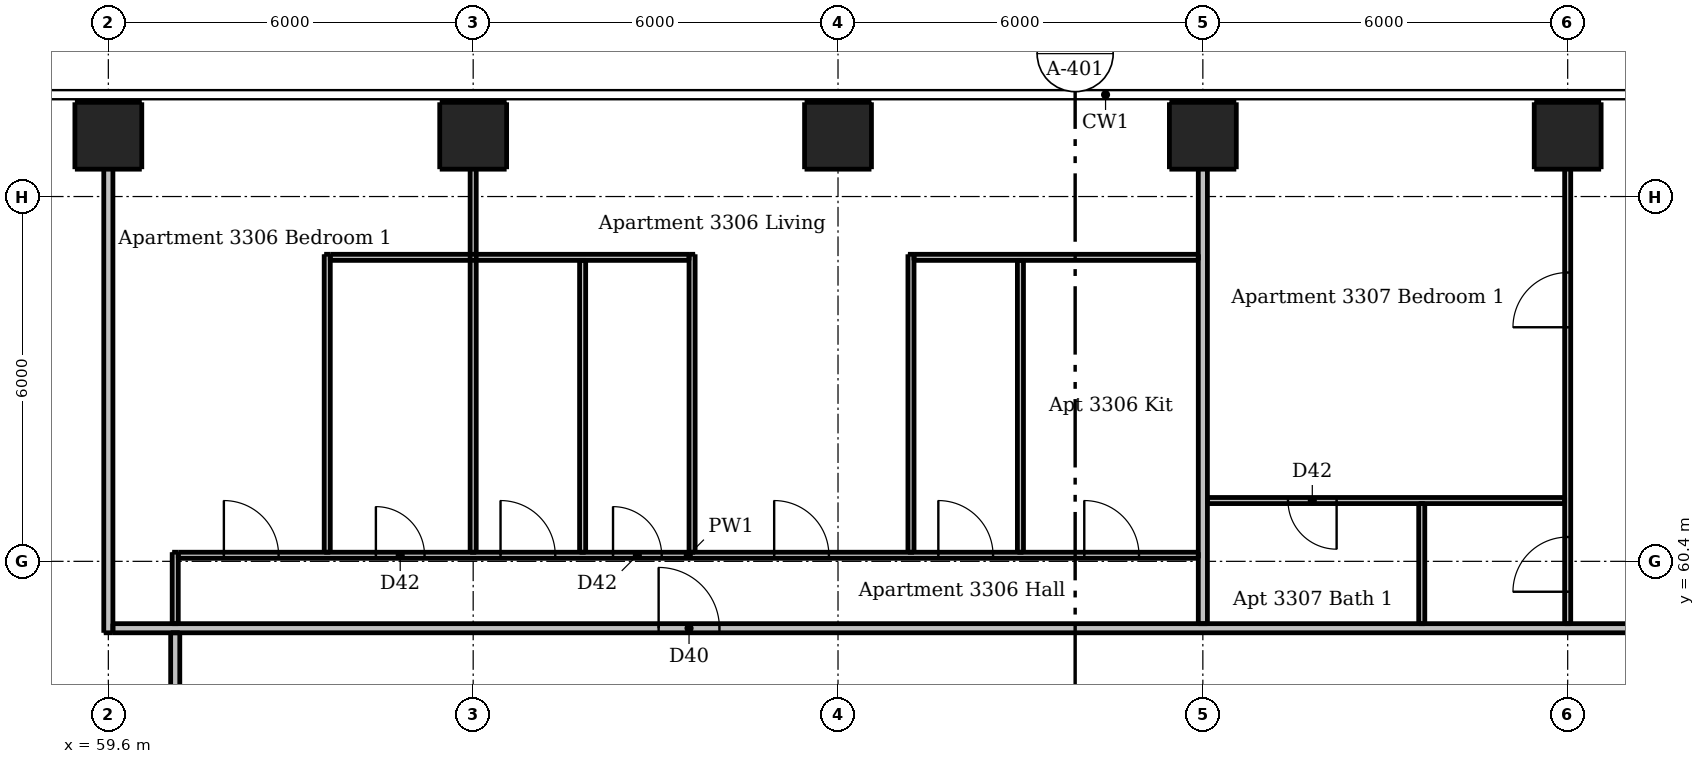
"""IFC4 building model, lengths in metres.
Left out: names, types, materials, properties, quantities, classifications, styles, units other than length and angle.
Written with IfcOpenShell. Run it as: python <this file> out.ifc"""

import sys

from ifc_helpers import new_model, si_unit, direction, frame, frame_2d, origin, origin_2d, place, context, subcontext, project, spatial, rectangle, extrude, element, fill, save


model = new_model("IFC4")
c1 = context("Model", 3, precision=1e-05, world=origin(), true_north=direction((0.0, 1.0)))
c2 = subcontext(c1, "Body", "Model", "MODEL_VIEW")
j1 = project(units=[si_unit("LENGTHUNIT", "METRE"), si_unit("PLANEANGLEUNIT", "RADIAN")], contexts=[c1])
p1 = place(None, origin())
s1 = spatial("IfcSite", under=j1, at=p1, CompositionType="ELEMENT")
p2 = place(p1, origin())
s2 = spatial("IfcBuilding", under=s1, at=p2, CompositionType="ELEMENT")
p3 = place(p2, frame((0.0, 0.0, 121.6)))
s3 = spatial("IfcBuildingStorey", under=s2, at=p3, CompositionType="ELEMENT", Elevation=121.6)
for number, where, z_axis, x_axis in (
    (1, (59.6, 67.4, 0.0), (0.0, 0.0, 1.0), (1.0, 0.0, 0.0)),
    (2, (65.6, 67.4, 0.0), (0.0, 0.0, 1.0), (1.0, 0.0, 0.0)),
    (3, (71.6, 67.4, 0.0), (0.0, 0.0, 1.0), (1.0, 0.0, 0.0)),
    (4, (77.6, 67.4, 0.0), (0.0, 0.0, 1.0), (1.0, 0.0, 0.0)),
    (5, (83.6, 67.4, 0.0), (0.0, 0.0, 1.0), (1.0, 0.0, 0.0)),
):
    element("IfcColumn", number, at=place(p3, frame(where, z_axis=z_axis, x_axis=x_axis)), inside=s3, PredefinedType="COLUMN", context=c2, shape_type="SweptSolid", body=[
        extrude(rectangle(XDim=1.1, YDim=1.1, at=origin_2d()), origin(), (0.0, 0.0, 1.0), 2.95),
    ])
p4 = place(p3, frame((60.7, 59.375, 0.0), z_axis=(0.0, 0.0, 1.0), x_axis=(0.0, 1.0, 0.0)))
e6 = element("IfcWall", 6, at=p4, inside=s3, PredefinedType="PARTITIONING", context=c2, shape_type="SweptSolid", body=[
    extrude(rectangle(XDim=1.175, YDim=0.1, at=frame_2d((0.587, 0.0))), origin(), (0.0, 0.0, 1.0), 2.95),
])
p5 = place(p3, frame((63.2, 60.55, 0.0), z_axis=(0.0, 0.0, 1.0), x_axis=(0.0, 1.0, 0.0)))
e7 = element("IfcWall", 7, at=p5, inside=s3, PredefinedType="PARTITIONING", context=c2, shape_type="SweptSolid", body=[
    extrude(rectangle(XDim=4.9, YDim=0.1, at=frame_2d((2.45, 0.0))), origin(), (0.0, 0.0, 1.0), 2.95),
])
p6 = place(p3, frame((65.6, 60.55, 0.0), z_axis=(0.0, 0.0, 1.0), x_axis=(0.0, 1.0, 0.0)))
e8 = element("IfcWall", 8, at=p6, inside=s3, PredefinedType="PARTITIONING", context=c2, shape_type="SweptSolid", body=[
    extrude(rectangle(XDim=7.45, YDim=0.1, at=frame_2d((3.725, 0.0))), origin(), (0.0, 0.0, 1.0), 2.332),
])
p7 = place(p3, frame((67.4, 60.55, 0.0), z_axis=(0.0, 0.0, 1.0), x_axis=(0.0, 1.0, 0.0)))
e9 = element("IfcWall", 9, at=p7, inside=s3, PredefinedType="PARTITIONING", context=c2, shape_type="SweptSolid", body=[
    extrude(rectangle(XDim=4.8, YDim=0.1, at=frame_2d((2.4, 0.0))), origin(), (0.0, 0.0, 1.0), 2.95),
])
for number, where, z_axis, x_axis in (
    (10, (69.2, 60.55, 0.0), (0.0, 0.0, 1.0), (0.0, 1.0, 0.0)),
    (11, (72.8, 60.55, 0.0), (0.0, 0.0, 1.0), (0.0, 1.0, 0.0)),
):
    element("IfcWall", number, at=place(p3, frame(where, z_axis=z_axis, x_axis=x_axis)), inside=s3, PredefinedType="PARTITIONING", context=c2, shape_type="SweptSolid", body=[
        extrude(rectangle(XDim=4.9, YDim=0.1, at=frame_2d((2.45, 0.0))), origin(), (0.0, 0.0, 1.0), 2.95),
    ])
p8 = place(p3, frame((74.6, 60.55, 0.0), z_axis=(0.0, 0.0, 1.0), x_axis=(0.0, 1.0, 0.0)))
e12 = element("IfcWall", 12, at=p8, inside=s3, PredefinedType="PARTITIONING", context=c2, shape_type="SweptSolid", body=[
    extrude(rectangle(XDim=4.8, YDim=0.1, at=frame_2d((2.4, 0.0))), origin(), (0.0, 0.0, 1.0), 2.95),
])
p9 = place(p3, frame((81.2, 59.375, 0.0), z_axis=(0.0, 0.0, 1.0), x_axis=(0.0, 1.0, 0.0)))
e13 = element("IfcWall", 13, at=p9, inside=s3, PredefinedType="PARTITIONING", context=c2, shape_type="SweptSolid", body=[
    extrude(rectangle(XDim=1.975, YDim=0.1, at=frame_2d((0.988, 0.0))), origin(), (0.0, 0.0, 1.0), 2.95),
])
p10 = place(p3, frame((83.6, 59.375, 0.0), z_axis=(0.0, 0.0, 1.0), x_axis=(0.0, 1.0, 0.0)))
e14 = element("IfcWall", 14, at=p10, inside=s3, PredefinedType="PARTITIONING", context=c2, shape_type="SweptSolid", body=[
    extrude(rectangle(XDim=8.625, YDim=0.1, at=frame_2d((4.312, 0.0))), origin(), (0.0, 0.0, 1.0), 2.332),
])
p11 = place(p10, frame((0.525, 0.0, 0.0)))
e15 = element("IfcOpeningElement", 15, at=p11, cuts=e14, PredefinedType="OPENING", context=c2, shape_type="SweptSolid", body=[
    extrude(rectangle(XDim=0.9, YDim=2.1, at=frame_2d((0.45, 1.05))), frame((0.0, 0.06, 0.0), z_axis=(0.0, -1.0, 0.0), x_axis=(1.0, 0.0, 0.0)), (0.0, 0.0, 1.0), 0.12),
])
p12 = place(p10, frame((4.875, 0.0, 0.0)))
e16 = element("IfcOpeningElement", 16, at=p12, cuts=e14, PredefinedType="OPENING", context=c2, shape_type="SweptSolid", body=[
    extrude(rectangle(XDim=0.9, YDim=2.1, at=frame_2d((0.45, 1.05))), frame((0.0, 0.06, 0.0), z_axis=(0.0, -1.0, 0.0), x_axis=(1.0, 0.0, 0.0)), (0.0, 0.0, 1.0), 0.12),
])
p13 = place(p3, frame((63.25, 65.4, 0.0), z_axis=(0.0, 0.0, 1.0), x_axis=(1.0, 0.0, 0.0)))
e17 = element("IfcWall", 17, at=p13, inside=s3, PredefinedType="PARTITIONING", context=c2, shape_type="SweptSolid", body=[
    extrude(rectangle(XDim=5.9, YDim=0.1, at=frame_2d((2.95, 0.0))), origin(), (0.0, 0.0, 1.0), 2.95),
])
p14 = place(p3, frame((72.85, 65.4, 0.0), z_axis=(0.0, 0.0, 1.0), x_axis=(1.0, 0.0, 0.0)))
e18 = element("IfcWall", 18, at=p14, inside=s3, PredefinedType="PARTITIONING", context=c2, shape_type="SweptSolid", body=[
    extrude(rectangle(XDim=4.675, YDim=0.1, at=frame_2d((2.337, 0.0))), origin(), (0.0, 0.0, 1.0), 2.95),
])
p15 = place(p3, frame((83.55, 61.4, 0.0), z_axis=(0.0, 0.0, 1.0), x_axis=(-1.0, 0.0, 0.0)))
e19 = element("IfcWall", 19, at=p15, inside=s3, PredefinedType="PARTITIONING", context=c2, shape_type="SweptSolid", body=[
    extrude(rectangle(XDim=5.875, YDim=0.1, at=frame_2d((2.938, 0.0))), origin(), (0.0, 0.0, 1.0), 2.95),
])
p16 = place(p15, frame((3.75, 0.0, 0.0)))
e20 = element("IfcOpeningElement", 20, at=p16, cuts=e19, PredefinedType="OPENING", context=c2, shape_type="SweptSolid", body=[
    extrude(rectangle(XDim=0.8, YDim=2.1, at=frame_2d((0.4, 1.05))), frame((0.0, 0.06, 0.0), z_axis=(0.0, -1.0, 0.0), x_axis=(1.0, 0.0, 0.0)), (0.0, 0.0, 1.0), 0.12),
])
p17 = place(p3, frame((60.75, 60.5, 0.0), z_axis=(0.0, 0.0, 1.0), x_axis=(1.0, 0.0, 0.0)))
e21 = element("IfcWall", 21, at=p17, inside=s3, PredefinedType="PARTITIONING", context=c2, shape_type="SweptSolid", body=[
    extrude(rectangle(XDim=16.775, YDim=0.1, at=frame_2d((8.387, 0.0))), origin(), (0.0, 0.0, 1.0), 2.95),
])
p18 = place(p17, frame((9.8, 0.0, 0.0)))
e22 = element("IfcOpeningElement", 22, at=p18, cuts=e21, PredefinedType="OPENING", context=c2, shape_type="SweptSolid", body=[
    extrude(rectangle(XDim=0.9, YDim=2.1, at=frame_2d((0.45, 1.05))), frame((0.0, 0.06, 0.0), z_axis=(0.0, -1.0, 0.0), x_axis=(1.0, 0.0, 0.0)), (0.0, 0.0, 1.0), 0.12),
])
p19 = place(p17, frame((14.9, 0.0, 0.0)))
e23 = element("IfcOpeningElement", 23, at=p19, cuts=e21, PredefinedType="OPENING", context=c2, shape_type="SweptSolid", body=[
    extrude(rectangle(XDim=0.9, YDim=2.1, at=frame_2d((0.45, 1.05))), frame((0.0, 0.06, 0.0), z_axis=(0.0, -1.0, 0.0), x_axis=(1.0, 0.0, 0.0)), (0.0, 0.0, 1.0), 0.12),
])
p20 = place(p17, frame((12.5, 0.0, 0.0)))
e24 = element("IfcOpeningElement", 24, at=p20, cuts=e21, PredefinedType="OPENING", context=c2, shape_type="SweptSolid", body=[
    extrude(rectangle(XDim=0.9, YDim=2.1, at=frame_2d((0.45, 1.05))), frame((0.0, 0.06, 0.0), z_axis=(0.0, -1.0, 0.0), x_axis=(1.0, 0.0, 0.0)), (0.0, 0.0, 1.0), 0.12),
])
p21 = place(p17, frame((5.3, 0.0, 0.0)))
e25 = element("IfcOpeningElement", 25, at=p21, cuts=e21, PredefinedType="OPENING", context=c2, shape_type="SweptSolid", body=[
    extrude(rectangle(XDim=0.9, YDim=2.1, at=frame_2d((0.45, 1.05))), frame((0.0, 0.06, 0.0), z_axis=(0.0, -1.0, 0.0), x_axis=(1.0, 0.0, 0.0)), (0.0, 0.0, 1.0), 0.12),
])
p22 = place(p17, frame((7.15, 0.0, 0.0)))
e26 = element("IfcOpeningElement", 26, at=p22, cuts=e21, PredefinedType="OPENING", context=c2, shape_type="SweptSolid", body=[
    extrude(rectangle(XDim=0.8, YDim=2.1, at=frame_2d((0.4, 1.05))), frame((0.0, 0.06, 0.0), z_axis=(0.0, -1.0, 0.0), x_axis=(1.0, 0.0, 0.0)), (0.0, 0.0, 1.0), 0.12),
])
p23 = place(p17, frame((0.75, 0.0, 0.0)))
e27 = element("IfcOpeningElement", 27, at=p23, cuts=e21, PredefinedType="OPENING", context=c2, shape_type="SweptSolid", body=[
    extrude(rectangle(XDim=0.9, YDim=2.1, at=frame_2d((0.45, 1.05))), frame((0.0, 0.06, 0.0), z_axis=(0.0, -1.0, 0.0), x_axis=(1.0, 0.0, 0.0)), (0.0, 0.0, 1.0), 0.12),
])
p24 = place(p17, frame((3.25, 0.0, 0.0)))
e28 = element("IfcOpeningElement", 28, at=p24, cuts=e21, PredefinedType="OPENING", context=c2, shape_type="SweptSolid", body=[
    extrude(rectangle(XDim=0.8, YDim=2.1, at=frame_2d((0.4, 1.05))), frame((0.0, 0.06, 0.0), z_axis=(0.0, -1.0, 0.0), x_axis=(1.0, 0.0, 0.0)), (0.0, 0.0, 1.0), 0.12),
])
p25 = place(p3, frame((59.6, 59.225, 0.0), z_axis=(0.0, 0.0, 1.0), x_axis=(0.0, 1.0, 0.0)))
e29 = element("IfcWall", 29, at=p25, inside=s3, PredefinedType="PARTITIONING", context=c2, shape_type="SweptSolid", body=[
    extrude(rectangle(XDim=8.775, YDim=0.15, at=frame_2d((4.387, 0.0))), origin(), (0.0, 0.0, 1.0), 2.332),
])
p26 = place(p3, frame((60.7, 30.325, 0.0), z_axis=(0.0, 0.0, 1.0), x_axis=(0.0, 1.0, 0.0)))
e30 = element("IfcWall", 30, at=p26, inside=s3, PredefinedType="PARTITIONING", context=c2, shape_type="SweptSolid", body=[
    extrude(rectangle(XDim=28.9, YDim=0.15, at=frame_2d((14.45, 0.0))), origin(), (0.0, 0.0, 1.0), 2.95),
])
p27 = place(p26, frame((9.225, 0.0, 0.0)))
e31 = element("IfcOpeningElement", 31, at=p27, cuts=e30, PredefinedType="OPENING", context=c2, shape_type="SweptSolid", body=[
    extrude(rectangle(XDim=1.0, YDim=2.1, at=frame_2d((0.5, 1.05))), frame((0.0, 0.085, 0.0), z_axis=(0.0, -1.0, 0.0), x_axis=(1.0, 0.0, 0.0)), (0.0, 0.0, 1.0), 0.17),
])
p28 = place(p26, frame((26.025, 0.0, 0.0)))
e32 = element("IfcOpeningElement", 32, at=p28, cuts=e30, PredefinedType="OPENING", context=c2, shape_type="SweptSolid", body=[
    extrude(rectangle(XDim=1.0, YDim=2.1, at=frame_2d((0.5, 1.05))), frame((0.0, 0.085, 0.0), z_axis=(0.0, -1.0, 0.0), x_axis=(1.0, 0.0, 0.0)), (0.0, 0.0, 1.0), 0.17),
])
p29 = place(p3, frame((77.6, 59.375, 0.0), z_axis=(0.0, 0.0, 1.0), x_axis=(0.0, 1.0, 0.0)))
e33 = element("IfcWall", 33, at=p29, inside=s3, PredefinedType="PARTITIONING", context=c2, shape_type="SweptSolid", body=[
    extrude(rectangle(XDim=8.625, YDim=0.15, at=frame_2d((4.312, 0.0))), origin(), (0.0, 0.0, 1.0), 2.332),
])
p30 = place(p3, frame((59.675, 59.3, 0.0), z_axis=(0.0, 0.0, 1.0), x_axis=(1.0, 0.0, 0.0)))
e34 = element("IfcWall", 34, at=p30, inside=s3, PredefinedType="PARTITIONING", context=c2, shape_type="SweptSolid", body=[
    extrude(rectangle(XDim=28.55, YDim=0.15, at=frame_2d((14.275, 0.0))), origin(), (0.0, 0.0, 1.0), 2.95),
])
p31 = place(p30, frame((8.975, 0.0, 0.0)))
e35 = element("IfcOpeningElement", 35, at=p31, cuts=e34, PredefinedType="OPENING", context=c2, shape_type="SweptSolid", body=[
    extrude(rectangle(XDim=1.0, YDim=2.1, at=frame_2d((0.5, 1.05))), frame((0.0, 0.085, 0.0), z_axis=(0.0, -1.0, 0.0), x_axis=(1.0, 0.0, 0.0)), (0.0, 0.0, 1.0), 0.17),
])
p32 = place(p30, frame((25.775, 0.0, 0.0)))
e36 = element("IfcOpeningElement", 36, at=p32, cuts=e34, PredefinedType="OPENING", context=c2, shape_type="SweptSolid", body=[
    extrude(rectangle(XDim=1.0, YDim=2.1, at=frame_2d((0.5, 1.05))), frame((0.0, 0.085, 0.0), z_axis=(0.0, -1.0, 0.0), x_axis=(1.0, 0.0, 0.0)), (0.0, 0.0, 1.0), 0.17),
])
p33 = place(p31, origin())
e37 = element("IfcDoor", 37, at=p33, inside=s3, OperationType="SINGLE_SWING_LEFT", PredefinedType="DOOR", context=c2, shape_type="SweptSolid", body=[
    extrude(rectangle(XDim=1.0, YDim=2.1, at=frame_2d((0.5, 1.05))), frame((0.0, 0.025, 0.0), z_axis=(0.0, -1.0, 0.0), x_axis=(1.0, 0.0, 0.0)), (0.0, 0.0, 1.0), 0.05),
])
fill(e35, e37)
p34 = place(p18, origin())
e38 = element("IfcDoor", 38, at=p34, inside=s3, OperationType="SINGLE_SWING_LEFT", PredefinedType="DOOR", context=c2, shape_type="SweptSolid", body=[
    extrude(rectangle(XDim=0.9, YDim=2.1, at=frame_2d((0.45, 1.05))), frame((0.0, 0.025, 0.0), z_axis=(0.0, -1.0, 0.0), x_axis=(1.0, 0.0, 0.0)), (0.0, 0.0, 1.0), 0.05),
])
fill(e22, e38)
p35 = place(p19, origin())
e39 = element("IfcDoor", 39, at=p35, inside=s3, OperationType="SINGLE_SWING_LEFT", PredefinedType="DOOR", context=c2, shape_type="SweptSolid", body=[
    extrude(rectangle(XDim=0.9, YDim=2.1, at=frame_2d((0.45, 1.05))), frame((0.0, 0.025, 0.0), z_axis=(0.0, -1.0, 0.0), x_axis=(1.0, 0.0, 0.0)), (0.0, 0.0, 1.0), 0.05),
])
fill(e23, e39)
p36 = place(p20, origin())
e40 = element("IfcDoor", 40, at=p36, inside=s3, OperationType="SINGLE_SWING_LEFT", PredefinedType="DOOR", context=c2, shape_type="SweptSolid", body=[
    extrude(rectangle(XDim=0.9, YDim=2.1, at=frame_2d((0.45, 1.05))), frame((0.0, 0.025, 0.0), z_axis=(0.0, -1.0, 0.0), x_axis=(1.0, 0.0, 0.0)), (0.0, 0.0, 1.0), 0.05),
])
fill(e24, e40)
p37 = place(p21, origin())
e41 = element("IfcDoor", 41, at=p37, inside=s3, OperationType="SINGLE_SWING_LEFT", PredefinedType="DOOR", context=c2, shape_type="SweptSolid", body=[
    extrude(rectangle(XDim=0.9, YDim=2.1, at=frame_2d((0.45, 1.05))), frame((0.0, 0.025, 0.0), z_axis=(0.0, -1.0, 0.0), x_axis=(1.0, 0.0, 0.0)), (0.0, 0.0, 1.0), 0.05),
])
fill(e25, e41)
p38 = place(p22, origin())
e42 = element("IfcDoor", 42, at=p38, inside=s3, OperationType="SINGLE_SWING_LEFT", PredefinedType="DOOR", context=c2, shape_type="SweptSolid", body=[
    extrude(rectangle(XDim=0.8, YDim=2.1, at=frame_2d((0.4, 1.05))), frame((0.0, 0.025, 0.0), z_axis=(0.0, -1.0, 0.0), x_axis=(1.0, 0.0, 0.0)), (0.0, 0.0, 1.0), 0.05),
])
fill(e26, e42)
p39 = place(p23, origin())
e43 = element("IfcDoor", 43, at=p39, inside=s3, OperationType="SINGLE_SWING_LEFT", PredefinedType="DOOR", context=c2, shape_type="SweptSolid", body=[
    extrude(rectangle(XDim=0.9, YDim=2.1, at=frame_2d((0.45, 1.05))), frame((0.0, 0.025, 0.0), z_axis=(0.0, -1.0, 0.0), x_axis=(1.0, 0.0, 0.0)), (0.0, 0.0, 1.0), 0.05),
])
fill(e27, e43)
p40 = place(p24, origin())
e44 = element("IfcDoor", 44, at=p40, inside=s3, OperationType="SINGLE_SWING_LEFT", PredefinedType="DOOR", context=c2, shape_type="SweptSolid", body=[
    extrude(rectangle(XDim=0.8, YDim=2.1, at=frame_2d((0.4, 1.05))), frame((0.0, 0.025, 0.0), z_axis=(0.0, -1.0, 0.0), x_axis=(1.0, 0.0, 0.0)), (0.0, 0.0, 1.0), 0.05),
])
fill(e28, e44)
p41 = place(p11, origin())
e45 = element("IfcDoor", 45, at=p41, inside=s3, OperationType="SINGLE_SWING_LEFT", PredefinedType="DOOR", context=c2, shape_type="SweptSolid", body=[
    extrude(rectangle(XDim=0.9, YDim=2.1, at=frame_2d((0.45, 1.05))), frame((0.0, 0.025, 0.0), z_axis=(0.0, -1.0, 0.0), x_axis=(1.0, 0.0, 0.0)), (0.0, 0.0, 1.0), 0.05),
])
fill(e15, e45)
p42 = place(p12, origin())
e46 = element("IfcDoor", 46, at=p42, inside=s3, OperationType="SINGLE_SWING_LEFT", PredefinedType="DOOR", context=c2, shape_type="SweptSolid", body=[
    extrude(rectangle(XDim=0.9, YDim=2.1, at=frame_2d((0.45, 1.05))), frame((0.0, 0.025, 0.0), z_axis=(0.0, -1.0, 0.0), x_axis=(1.0, 0.0, 0.0)), (0.0, 0.0, 1.0), 0.05),
])
fill(e16, e46)
p43 = place(p16, origin())
e47 = element("IfcDoor", 47, at=p43, inside=s3, OperationType="SINGLE_SWING_LEFT", PredefinedType="DOOR", context=c2, shape_type="SweptSolid", body=[
    extrude(rectangle(XDim=0.8, YDim=2.1, at=frame_2d((0.4, 1.05))), frame((0.0, 0.025, 0.0), z_axis=(0.0, -1.0, 0.0), x_axis=(1.0, 0.0, 0.0)), (0.0, 0.0, 1.0), 0.05),
])
fill(e20, e47)
save(model, sys.argv[1])
